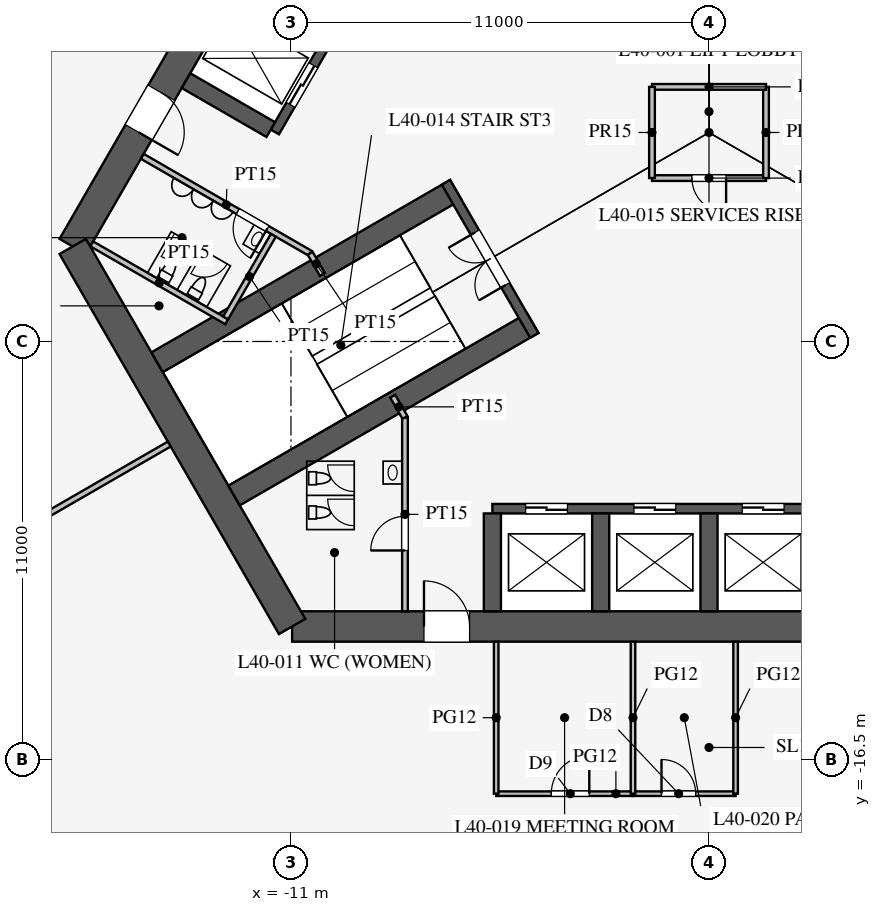
"""IFC4 building model, lengths in metres.
Left out: names, types, materials, properties, quantities, classifications, styles, units other than length and angle.
Written with IfcOpenShell. Run it as: python <this file> out.ifc"""

import sys

from ifc_helpers import new_model, si_unit, direction, frame, frame_2d, origin, place, context, subcontext, project, spatial, rectangle, extrude, element, fill, save


model = new_model("IFC4")
c1 = context("Model", 3, precision=1e-05, world=origin(), true_north=direction((0.0, 1.0)))
c2 = subcontext(c1, "Body", "Model", "MODEL_VIEW")
j1 = project(units=[si_unit("LENGTHUNIT", "METRE"), si_unit("PLANEANGLEUNIT", "RADIAN")], contexts=[c1])
p1 = place(None, origin())
s1 = spatial("IfcSite", under=j1, at=p1, CompositionType="ELEMENT")
p2 = place(p1, origin())
s2 = spatial("IfcBuilding", under=s1, at=p2, CompositionType="ELEMENT")
p3 = place(p2, frame((0.0, 0.0, 174.5)))
s3 = spatial("IfcBuildingStorey", under=s2, at=p3, CompositionType="ELEMENT", Elevation=174.5)
p4 = place(p3, frame((-10.97, -13.0, 0.0), z_axis=(0.0, 0.0, 1.0), x_axis=(1.0, 0.0, 0.0)))
e1 = element("IfcWall", 1, at=p4, inside=s3, PredefinedType="SHEAR", context=c2, shape_type="SweptSolid", body=[
    extrude(rectangle(XDim=21.939, YDim=0.8, at=frame_2d((10.97, 0.0))), origin(), (0.0, 0.0, 1.0), 4.2),
])
p5 = place(p4, frame((17.27, 0.0, 0.0)))
e2 = element("IfcOpeningElement", 2, at=p5, cuts=e1, PredefinedType="OPENING", context=c2, shape_type="SweptSolid", body=[
    extrude(rectangle(XDim=1.2, YDim=2.1, at=frame_2d((0.6, 1.05))), frame((0.0, 0.41, 0.0), z_axis=(0.0, -1.0, 0.0), x_axis=(1.0, 0.0, 0.0)), (0.0, 0.0, 1.0), 0.82),
])
p6 = place(p4, frame((3.47, 0.0, 0.0)))
e3 = element("IfcOpeningElement", 3, at=p6, cuts=e1, PredefinedType="OPENING", context=c2, shape_type="SweptSolid", body=[
    extrude(rectangle(XDim=1.2, YDim=2.1, at=frame_2d((0.6, 1.05))), frame((0.0, 0.41, 0.0), z_axis=(0.0, -1.0, 0.0), x_axis=(1.0, 0.0, 0.0)), (0.0, 0.0, 1.0), 0.82),
])
p7 = place(p3, frame((-5.773, 16.0, 0.0), z_axis=(0.0, 0.0, 1.0), x_axis=(-0.500002442456, -0.866023993627, 0.0)))
e4 = element("IfcWall", 4, at=p7, inside=s3, PredefinedType="SHEAR", context=c2, shape_type="SweptSolid", body=[
    extrude(rectangle(XDim=21.939, YDim=0.8, at=frame_2d((10.97, 0.0))), origin(), (0.0, 0.0, 1.0), 4.2),
])
p8 = place(p7, frame((17.27, 0.0, 0.0)))
e5 = element("IfcOpeningElement", 5, at=p8, cuts=e4, PredefinedType="OPENING", context=c2, shape_type="SweptSolid", body=[
    extrude(rectangle(XDim=1.2, YDim=2.1, at=frame_2d((0.6, 1.05))), frame((0.0, 0.41, 0.0), z_axis=(0.0, -1.0, 0.0), x_axis=(1.0, 0.0, 0.0)), (0.0, 0.0, 1.0), 0.82),
])
p9 = place(p7, frame((3.47, 0.0, 0.0)))
e6 = element("IfcOpeningElement", 6, at=p9, cuts=e4, PredefinedType="OPENING", context=c2, shape_type="SweptSolid", body=[
    extrude(rectangle(XDim=1.2, YDim=2.1, at=frame_2d((0.6, 1.05))), frame((0.0, 0.41, 0.0), z_axis=(0.0, -1.0, 0.0), x_axis=(1.0, 0.0, 0.0)), (0.0, 0.0, 1.0), 0.82),
])
p10 = place(p3, frame((-16.743, -3.0, 0.0), z_axis=(0.0, 0.0, 1.0), x_axis=(0.499995765644, -0.866027848477, 0.0)))
e7 = element("IfcWall", 7, at=p10, inside=s3, PredefinedType="SHEAR", context=c2, shape_type="SweptSolid", body=[
    extrude(rectangle(XDim=11.547, YDim=0.8, at=frame_2d((5.773, 0.0))), origin(), (0.0, 0.0, 1.0), 4.2),
])
p11 = place(p3, frame((-5.7, -9.9, 0.0), z_axis=(0.0, 0.0, 1.0), x_axis=(1.0, 0.0, 0.0)))
e8 = element("IfcWall", 8, at=p11, inside=s3, PredefinedType="SHEAR", context=c2, shape_type="SweptSolid", body=[
    extrude(rectangle(XDim=11.4, YDim=0.25, at=frame_2d((5.7, 0.0))), origin(), (0.0, 0.0, 1.0), 4.2),
])
p12 = place(p11, frame((0.875, 0.0, 0.0)))
e9 = element("IfcOpeningElement", 9, at=p12, cuts=e8, PredefinedType="OPENING", context=c2, shape_type="SweptSolid", body=[
    extrude(rectangle(XDim=1.1, YDim=2.2, at=frame_2d((0.55, 1.1))), frame((0.0, 0.135, 0.0), z_axis=(0.0, -1.0, 0.0), x_axis=(1.0, 0.0, 0.0)), (0.0, 0.0, 1.0), 0.27),
])
p13 = place(p11, frame((3.725, 0.0, 0.0)))
e10 = element("IfcOpeningElement", 10, at=p13, cuts=e8, PredefinedType="OPENING", context=c2, shape_type="SweptSolid", body=[
    extrude(rectangle(XDim=1.1, YDim=2.2, at=frame_2d((0.55, 1.1))), frame((0.0, 0.135, 0.0), z_axis=(0.0, -1.0, 0.0), x_axis=(1.0, 0.0, 0.0)), (0.0, 0.0, 1.0), 0.27),
])
p14 = place(p11, frame((6.575, 0.0, 0.0)))
e11 = element("IfcOpeningElement", 11, at=p14, cuts=e8, PredefinedType="OPENING", context=c2, shape_type="SweptSolid", body=[
    extrude(rectangle(XDim=1.1, YDim=2.2, at=frame_2d((0.55, 1.1))), frame((0.0, 0.135, 0.0), z_axis=(0.0, -1.0, 0.0), x_axis=(1.0, 0.0, 0.0)), (0.0, 0.0, 1.0), 0.27),
])
p15 = place(p11, frame((9.425, 0.0, 0.0)))
e12 = element("IfcOpeningElement", 12, at=p15, cuts=e8, PredefinedType="OPENING", context=c2, shape_type="SweptSolid", body=[
    extrude(rectangle(XDim=1.1, YDim=2.2, at=frame_2d((0.55, 1.1))), frame((0.0, 0.135, 0.0), z_axis=(0.0, -1.0, 0.0), x_axis=(1.0, 0.0, 0.0)), (0.0, 0.0, 1.0), 0.27),
])
for number, where, z_axis, x_axis in (
    (13, (-5.7, -10.025, 0.0), (0.0, 0.0, 1.0), (0.0, -1.0, 0.0)),
    (14, (-2.85, -10.025, 0.0), (0.0, 0.0, 1.0), (0.0, -1.0, 0.0)),
    (15, (0.0, -10.025, 0.0), (0.0, 0.0, 1.0), (0.0, -1.0, 0.0)),
):
    element("IfcWall", number, at=place(p3, frame(where, z_axis=z_axis, x_axis=x_axis)), inside=s3, PredefinedType="SHEAR", context=c2, shape_type="SweptSolid", body=[
        extrude(rectangle(XDim=2.575, YDim=0.45, at=frame_2d((1.288, 0.0))), origin(), (0.0, 0.0, 1.0), 4.2),
    ])
p16 = place(p3, frame((-5.724, 9.886, 0.0), z_axis=(0.0, 0.0, 1.0), x_axis=(-0.500001763848, -0.866024385424, 0.0)))
e16 = element("IfcWall", 16, at=p16, inside=s3, PredefinedType="SHEAR", context=c2, shape_type="SweptSolid", body=[
    extrude(rectangle(XDim=11.4, YDim=0.25, at=frame_2d((5.7, 0.0))), origin(), (0.0, 0.0, 1.0), 4.2),
])
p17 = place(p16, frame((6.525, 0.0, 0.0)))
e17 = element("IfcOpeningElement", 17, at=p17, cuts=e16, PredefinedType="OPENING", context=c2, shape_type="SweptSolid", body=[
    extrude(rectangle(XDim=1.2, YDim=2.2, at=frame_2d((0.6, 1.1))), frame((0.0, 0.135, 0.0), z_axis=(0.0, -1.0, 0.0), x_axis=(1.0, 0.0, 0.0)), (0.0, 0.0, 1.0), 0.27),
])
p18 = place(p16, frame((9.375, 0.0, 0.0)))
e18 = element("IfcOpeningElement", 18, at=p18, cuts=e16, PredefinedType="OPENING", context=c2, shape_type="SweptSolid", body=[
    extrude(rectangle(XDim=1.2, YDim=2.2, at=frame_2d((0.6, 1.1))), frame((0.0, 0.135, 0.0), z_axis=(0.0, -1.0, 0.0), x_axis=(1.0, 0.0, 0.0)), (0.0, 0.0, 1.0), 0.27),
])
p19 = place(p3, frame((-11.532, 0.076, 0.0), z_axis=(0.0, 0.0, 1.0), x_axis=(-0.866005588531, 0.500034319456, 0.0)))
e19 = element("IfcWall", 19, at=p19, inside=s3, PredefinedType="SHEAR", context=c2, shape_type="SweptSolid", body=[
    extrude(rectangle(XDim=2.575, YDim=0.45, at=frame_2d((1.288, 0.0))), origin(), (0.0, 0.0, 1.0), 4.2),
])
for number, where, z_axis, x_axis in (
    (20, (-6.663, -1.509, 0.0), (0.0, 0.0, 1.0), (-0.866, -0.5, 0.0)),
    (21, (-4.638, -5.016, 0.0), (0.0, 0.0, 1.0), (-0.866, -0.5, 0.0)),
):
    element("IfcWall", number, at=place(p3, frame(where, z_axis=z_axis, x_axis=x_axis)), inside=s3, PredefinedType="SHEAR", context=c2, shape_type="SweptSolid", body=[
        extrude(rectangle(XDim=9.075, YDim=0.6, at=frame_2d((4.538, 0.0))), origin(), (0.0, 0.0, 1.0), 4.2),
    ])
p20 = place(p3, frame((-6.922, -1.312, 0.0), z_axis=(0.0, 0.0, 1.0), x_axis=(0.499984536904, -0.866034331223, 0.0)))
e22 = element("IfcWall", 22, at=p20, inside=s3, PredefinedType="SHEAR", context=c2, shape_type="SweptSolid", body=[
    extrude(rectangle(XDim=4.65, YDim=0.25, at=frame_2d((2.325, 0.0))), origin(), (0.0, 0.0, 1.0), 4.2),
])
p21 = place(p20, frame((1.525, 0.0, 0.0)))
e23 = element("IfcOpeningElement", 23, at=p21, cuts=e22, PredefinedType="OPENING", context=c2, shape_type="SweptSolid", body=[
    extrude(rectangle(XDim=1.6, YDim=2.1, at=frame_2d((0.8, 1.05))), frame((0.0, 0.135, 0.0), z_axis=(0.0, -1.0, 0.0), x_axis=(1.0, 0.0, 0.0)), (0.0, 0.0, 1.0), 0.27),
])
p22 = place(p3, frame((-8.0, -7.5, 0.0), z_axis=(0.0, 0.0, 1.0), x_axis=(0.0, -1.0, 0.0)))
e24 = element("IfcWall", 24, at=p22, inside=s3, PredefinedType="PARTITIONING", context=c2, shape_type="SweptSolid", body=[
    extrude(rectangle(XDim=5.1, YDim=0.15, at=frame_2d((2.55, 0.0))), origin(), (0.0, 0.0, 1.0), 3.95),
])
p23 = place(p22, frame((2.6, 0.0, 0.0)))
e25 = element("IfcOpeningElement", 25, at=p23, cuts=e24, PredefinedType="OPENING", context=c2, shape_type="SweptSolid", body=[
    extrude(rectangle(XDim=0.9, YDim=2.1, at=frame_2d((0.45, 1.05))), frame((0.0, 0.085, 0.0), z_axis=(0.0, -1.0, 0.0), x_axis=(1.0, 0.0, 0.0)), (0.0, 0.0, 1.0), 0.17),
])
p24 = place(p3, frame((-10.495, -3.178, 0.0), z_axis=(0.0, 0.0, 1.0), x_axis=(-0.86602216432, 0.500005610874, 0.0)))
e26 = element("IfcWall", 26, at=p24, inside=s3, PredefinedType="PARTITIONING", context=c2, shape_type="SweptSolid", body=[
    extrude(rectangle(XDim=5.1, YDim=0.15, at=frame_2d((2.55, 0.0))), origin(), (0.0, 0.0, 1.0), 3.95),
])
p25 = place(p24, frame((1.3, 0.0, 0.0)))
e27 = element("IfcOpeningElement", 27, at=p25, cuts=e26, PredefinedType="OPENING", context=c2, shape_type="SweptSolid", body=[
    extrude(rectangle(XDim=0.9, YDim=2.1, at=frame_2d((0.45, 1.05))), frame((0.0, 0.085, 0.0), z_axis=(0.0, -1.0, 0.0), x_axis=(1.0, 0.0, 0.0)), (0.0, 0.0, 1.0), 0.17),
])
for number, where, z_axis, x_axis in (
    (28, (-10.495, -3.178, 0.0), (0.0, 0.0, 1.0), (0.5, -0.866, 0.0)),
    (29, (-8.0, -7.5, 0.0), (0.0, 0.0, 1.0), (-0.5, 0.866, 0.0)),
):
    element("IfcWall", number, at=place(p3, frame(where, z_axis=z_axis, x_axis=x_axis)), inside=s3, PredefinedType="PARTITIONING", context=c2, shape_type="SweptSolid", body=[
        extrude(rectangle(XDim=0.645, YDim=0.15, at=frame_2d((0.323, 0.0))), origin(), (0.0, 0.0, 1.0), 3.95),
    ])
p26 = place(p3, frame((-12.691, -4.982, 0.0), z_axis=(0.0, 0.0, 1.0), x_axis=(-0.8660249478, 0.500000789788, 0.0)))
e30 = element("IfcWall", 30, at=p26, inside=s3, PredefinedType="PARTITIONING", context=c2, shape_type="SweptSolid", body=[
    extrude(rectangle(XDim=4.1, YDim=0.15, at=frame_2d((2.05, 0.0))), origin(), (0.0, 0.0, 1.0), 3.95),
])
p27 = place(p3, frame((-11.464, -2.706, 0.0), z_axis=(0.0, 0.0, 1.0), x_axis=(-0.50001992892, -0.866013897511, 0.0)))
e31 = element("IfcWall", 31, at=p27, inside=s3, PredefinedType="PARTITIONING", context=c2, shape_type="SweptSolid", body=[
    extrude(rectangle(XDim=2.51, YDim=0.15, at=frame_2d((1.255, 0.0))), origin(), (0.0, 0.0, 1.0), 3.95),
])
p28 = place(p3, frame((-1.5, -1.2, 0.0), z_axis=(0.0, 0.0, 1.0), x_axis=(1.0, 0.0, 0.0)))
e32 = element("IfcWall", 32, at=p28, inside=s3, PredefinedType="PARTITIONING", context=c2, shape_type="SweptSolid", body=[
    extrude(rectangle(XDim=3.0, YDim=0.15, at=frame_2d((1.5, 0.0))), origin(), (0.0, 0.0, 1.0), 3.95),
])
p29 = place(p28, frame((1.05, 0.0, 0.0)))
e33 = element("IfcOpeningElement", 33, at=p29, cuts=e32, PredefinedType="OPENING", context=c2, shape_type="SweptSolid", body=[
    extrude(rectangle(XDim=0.9, YDim=2.1, at=frame_2d((0.45, 1.05))), frame((0.0, 0.085, 0.0), z_axis=(0.0, -1.0, 0.0), x_axis=(1.0, 0.0, 0.0)), (0.0, 0.0, 1.0), 0.17),
])
p30 = place(p3, frame((1.5, -1.2, 0.0), z_axis=(0.0, 0.0, 1.0), x_axis=(0.0, 1.0, 0.0)))
e34 = element("IfcWall", 34, at=p30, inside=s3, PredefinedType="PARTITIONING", context=c2, shape_type="SweptSolid", body=[
    extrude(rectangle(XDim=2.4, YDim=0.15, at=frame_2d((1.2, 0.0))), origin(), (0.0, 0.0, 1.0), 3.95),
])
p31 = place(p3, frame((1.5, 1.2, 0.0), z_axis=(0.0, 0.0, 1.0), x_axis=(-1.0, 0.0, 0.0)))
e35 = element("IfcWall", 35, at=p31, inside=s3, PredefinedType="PARTITIONING", context=c2, shape_type="SweptSolid", body=[
    extrude(rectangle(XDim=3.0, YDim=0.15, at=frame_2d((1.5, 0.0))), origin(), (0.0, 0.0, 1.0), 3.95),
])
p32 = place(p3, frame((-1.5, 1.2, 0.0), z_axis=(0.0, 0.0, 1.0), x_axis=(0.0, -1.0, 0.0)))
e36 = element("IfcWall", 36, at=p32, inside=s3, PredefinedType="PARTITIONING", context=c2, shape_type="SweptSolid", body=[
    extrude(rectangle(XDim=2.4, YDim=0.15, at=frame_2d((1.2, 0.0))), origin(), (0.0, 0.0, 1.0), 3.95),
])
p33 = place(p3, frame((-14.203, -8.2, 0.0), z_axis=(0.0, 0.0, 1.0), x_axis=(-0.866024668836, -0.500001272966, 0.0)))
e37 = element("IfcWall", 37, at=p33, inside=s3, PredefinedType="PARTITIONING", context=c2, shape_type="SweptSolid", body=[
    extrude(rectangle(XDim=16.65, YDim=0.15, at=frame_2d((8.325, 0.0))), origin(), (0.0, 0.0, 1.0), 1.95),
])
p34 = place(p3, frame((-2.0, -17.4, 0.0), z_axis=(0.0, 0.0, 1.0), x_axis=(1.0, 0.0, 0.0)))
e38 = element("IfcWall", 38, at=p34, inside=s3, PredefinedType="PARTITIONING", context=c2, shape_type="SweptSolid", body=[
    extrude(rectangle(XDim=2.7, YDim=0.12, at=frame_2d((1.35, 0.0))), origin(), (0.0, 0.0, 1.0), 2.9),
])
p35 = place(p34, frame((0.75, 0.0, 0.15)))
e39 = element("IfcOpeningElement", 39, at=p35, cuts=e38, PredefinedType="OPENING", context=c2, shape_type="SweptSolid", body=[
    extrude(rectangle(XDim=0.9, YDim=2.1, at=frame_2d((0.45, 1.05))), frame((0.0, 0.07, 0.0), z_axis=(0.0, -1.0, 0.0), x_axis=(1.0, 0.0, 0.0)), (0.0, 0.0, 1.0), 0.14),
])
p36 = place(p3, frame((-5.6, -17.4, 0.0), z_axis=(0.0, 0.0, 1.0), x_axis=(1.0, 0.0, 0.0)))
e40 = element("IfcWall", 40, at=p36, inside=s3, PredefinedType="PARTITIONING", context=c2, shape_type="SweptSolid", body=[
    extrude(rectangle(XDim=3.6, YDim=0.12, at=frame_2d((1.8, 0.0))), origin(), (0.0, 0.0, 1.0), 2.9),
])
p37 = place(p36, frame((1.45, 0.0, 0.15)))
e41 = element("IfcOpeningElement", 41, at=p37, cuts=e40, PredefinedType="OPENING", context=c2, shape_type="SweptSolid", body=[
    extrude(rectangle(XDim=1.0, YDim=2.1, at=frame_2d((0.5, 1.05))), frame((0.0, 0.07, 0.0), z_axis=(0.0, -1.0, 0.0), x_axis=(1.0, 0.0, 0.0)), (0.0, 0.0, 1.0), 0.14),
])
for number, where, z_axis, x_axis in (
    (42, (0.7, -13.4, 0.0), (0.0, 0.0, 1.0), (0.0, -1.0, 0.0)),
    (43, (-2.0, -13.4, 0.0), (0.0, 0.0, 1.0), (0.0, -1.0, 0.0)),
    (44, (-5.6, -13.4, 0.0), (0.0, 0.0, 1.0), (0.0, -1.0, 0.0)),
):
    element("IfcWall", number, at=place(p3, frame(where, z_axis=z_axis, x_axis=x_axis)), inside=s3, PredefinedType="PARTITIONING", context=c2, shape_type="SweptSolid", body=[
        extrude(rectangle(XDim=4.0, YDim=0.12, at=frame_2d((2.0, 0.0))), origin(), (0.0, 0.0, 1.0), 2.9),
    ])
p38 = place(p23, frame((0.9, 0.0, 0.0), z_axis=(0.0, 0.0, 1.0), x_axis=(-1.0, 0.0, 0.0)))
e45 = element("IfcDoor", 45, at=p38, inside=s3, OperationType="SINGLE_SWING_LEFT", PredefinedType="DOOR", context=c2, shape_type="SweptSolid", body=[
    extrude(rectangle(XDim=0.9, YDim=2.1, at=frame_2d((0.45, 1.05))), frame((0.0, 0.025, 0.0), z_axis=(0.0, -1.0, 0.0), x_axis=(1.0, 0.0, 0.0)), (0.0, 0.0, 1.0), 0.05),
])
fill(e25, e45)
p39 = place(p25, origin())
e46 = element("IfcDoor", 46, at=p39, inside=s3, OperationType="SINGLE_SWING_LEFT", PredefinedType="DOOR", context=c2, shape_type="SweptSolid", body=[
    extrude(rectangle(XDim=0.9, YDim=2.1, at=frame_2d((0.45, 1.05))), frame((0.0, 0.025, 0.0), z_axis=(0.0, -1.0, 0.0), x_axis=(1.0, 0.0, 0.0)), (0.0, 0.0, 1.0), 0.05),
])
fill(e27, e46)
p40 = place(p29, frame((0.9, 0.0, 0.0), z_axis=(0.0, 0.0, 1.0), x_axis=(-1.0, 0.0, 0.0)))
e47 = element("IfcDoor", 47, at=p40, inside=s3, OperationType="SINGLE_SWING_LEFT", PredefinedType="DOOR", context=c2, shape_type="SweptSolid", body=[
    extrude(rectangle(XDim=0.9, YDim=2.1, at=frame_2d((0.45, 1.05))), frame((0.0, 0.025, 0.0), z_axis=(0.0, -1.0, 0.0), x_axis=(1.0, 0.0, 0.0)), (0.0, 0.0, 1.0), 0.05),
])
fill(e33, e47)
p41 = place(p21, frame((1.6, 0.0, 0.0), z_axis=(0.0, 0.0, 1.0), x_axis=(-1.0, 0.0, 0.0)))
e48 = element("IfcDoor", 48, at=p41, inside=s3, OperationType="DOUBLE_DOOR_SINGLE_SWING", PredefinedType="DOOR", context=c2, shape_type="SweptSolid", body=[
    extrude(rectangle(XDim=1.6, YDim=2.1, at=frame_2d((0.8, 1.05))), frame((0.0, 0.025, 0.0), z_axis=(0.0, -1.0, 0.0), x_axis=(1.0, 0.0, 0.0)), (0.0, 0.0, 1.0), 0.05),
])
fill(e23, e48)
p42 = place(p6, origin())
e49 = element("IfcDoor", 49, at=p42, inside=s3, OperationType="SINGLE_SWING_LEFT", PredefinedType="DOOR", context=c2, shape_type="SweptSolid", body=[
    extrude(rectangle(XDim=1.2, YDim=2.1, at=frame_2d((0.6, 1.05))), frame((0.0, 0.025, 0.0), z_axis=(0.0, -1.0, 0.0), x_axis=(1.0, 0.0, 0.0)), (0.0, 0.0, 1.0), 0.05),
])
fill(e3, e49)
p43 = place(p8, origin())
e50 = element("IfcDoor", 50, at=p43, inside=s3, OperationType="SINGLE_SWING_RIGHT", PredefinedType="DOOR", context=c2, shape_type="SweptSolid", body=[
    extrude(rectangle(XDim=1.2, YDim=2.1, at=frame_2d((0.6, 1.05))), frame((0.0, 0.025, 0.0), z_axis=(0.0, -1.0, 0.0), x_axis=(1.0, 0.0, 0.0)), (0.0, 0.0, 1.0), 0.05),
])
fill(e5, e50)
p44 = place(p37, origin())
e51 = element("IfcDoor", 51, at=p44, inside=s3, OperationType="SINGLE_SWING_RIGHT", PredefinedType="DOOR", context=c2, shape_type="SweptSolid", body=[
    extrude(rectangle(XDim=1.0, YDim=2.1, at=frame_2d((0.5, 1.05))), frame((0.0, 0.025, 0.0), z_axis=(0.0, -1.0, 0.0), x_axis=(1.0, 0.0, 0.0)), (0.0, 0.0, 1.0), 0.05),
])
fill(e41, e51)
p45 = place(p35, origin())
e52 = element("IfcDoor", 52, at=p45, inside=s3, OperationType="SINGLE_SWING_LEFT", PredefinedType="DOOR", context=c2, shape_type="SweptSolid", body=[
    extrude(rectangle(XDim=0.9, YDim=2.1, at=frame_2d((0.45, 1.05))), frame((0.0, 0.025, 0.0), z_axis=(0.0, -1.0, 0.0), x_axis=(1.0, 0.0, 0.0)), (0.0, 0.0, 1.0), 0.05),
])
fill(e39, e52)
p46 = place(p12, origin())
e53 = element("IfcDoor", 53, at=p46, inside=s3, OperationType="DOUBLE_DOOR_SLIDING", PredefinedType="DOOR", context=c2, shape_type="SweptSolid", body=[
    extrude(rectangle(XDim=1.1, YDim=2.2, at=frame_2d((0.55, 1.1))), frame((0.0, 0.025, 0.0), z_axis=(0.0, -1.0, 0.0), x_axis=(1.0, 0.0, 0.0)), (0.0, 0.0, 1.0), 0.05),
])
fill(e9, e53)
p47 = place(p13, origin())
e54 = element("IfcDoor", 54, at=p47, inside=s3, OperationType="DOUBLE_DOOR_SLIDING", PredefinedType="DOOR", context=c2, shape_type="SweptSolid", body=[
    extrude(rectangle(XDim=1.1, YDim=2.2, at=frame_2d((0.55, 1.1))), frame((0.0, 0.025, 0.0), z_axis=(0.0, -1.0, 0.0), x_axis=(1.0, 0.0, 0.0)), (0.0, 0.0, 1.0), 0.05),
])
fill(e10, e54)
p48 = place(p14, origin())
e55 = element("IfcDoor", 55, at=p48, inside=s3, OperationType="DOUBLE_DOOR_SLIDING", PredefinedType="DOOR", context=c2, shape_type="SweptSolid", body=[
    extrude(rectangle(XDim=1.1, YDim=2.2, at=frame_2d((0.55, 1.1))), frame((0.0, 0.025, 0.0), z_axis=(0.0, -1.0, 0.0), x_axis=(1.0, 0.0, 0.0)), (0.0, 0.0, 1.0), 0.05),
])
fill(e11, e55)
p49 = place(p18, origin())
e56 = element("IfcDoor", 56, at=p49, inside=s3, OperationType="DOUBLE_DOOR_SLIDING", PredefinedType="DOOR", context=c2, shape_type="SweptSolid", body=[
    extrude(rectangle(XDim=1.2, YDim=2.2, at=frame_2d((0.6, 1.1))), frame((0.0, 0.025, 0.0), z_axis=(0.0, -1.0, 0.0), x_axis=(1.0, 0.0, 0.0)), (0.0, 0.0, 1.0), 0.05),
])
fill(e18, e56)
save(model, sys.argv[1])
